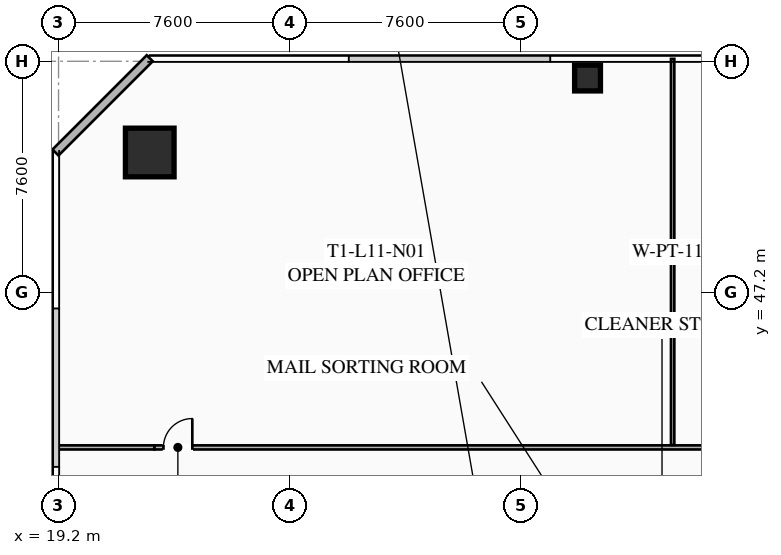
"""IFC4 building model, lengths in metres.
Left out: names, types, materials, properties, quantities, classifications, styles, units other than length and angle.
Written with IfcOpenShell. Run it as: python <this file> out.ifc"""

import sys

from ifc_helpers import new_model, si_unit, direction, frame, frame_2d, origin, origin_2d, place, context, subcontext, project, spatial, rectangle, hollow_rectangle, extrude, element, fill, save


model = new_model("IFC4")
c1 = context("Model", 3, precision=1e-05, world=origin(), true_north=direction((0.0, 1.0)))
c2 = subcontext(c1, "Body", "Model", "MODEL_VIEW")
j1 = project(units=[si_unit("LENGTHUNIT", "METRE"), si_unit("PLANEANGLEUNIT", "RADIAN")], contexts=[c1])
p1 = place(None, origin())
s1 = spatial("IfcSite", under=j1, at=p1, CompositionType="ELEMENT")
p2 = place(p1, origin())
s2 = spatial("IfcBuilding", under=s1, at=p2, CompositionType="ELEMENT")
p3 = place(p2, frame((0.0, 0.0, 45.9)))
s3 = spatial("IfcBuildingStorey", under=s2, at=p3, CompositionType="ELEMENT", Elevation=45.9)
p4 = place(p3, frame((22.2, 51.8, 0.0), z_axis=(0.0, 0.0, 1.0), x_axis=(1.0, 0.0, 0.0)))
e1 = element("IfcColumn", 1, at=p4, inside=s3, PredefinedType="COLUMN", context=c2, shape_type="SweptSolid", body=[
    extrude(hollow_rectangle(XDim=1.6, YDim=1.6, WallThickness=0.06, at=origin_2d()), origin(), (0.0, 0.0, 1.0), 3.35),
])
p5 = place(p3, frame((36.6, 54.25, 0.0), z_axis=(0.0, 0.0, 1.0), x_axis=(1.0, 0.0, 0.0)))
e2 = element("IfcColumn", 2, at=p5, inside=s3, PredefinedType="COLUMN", context=c2, shape_type="SweptSolid", body=[
    extrude(hollow_rectangle(XDim=0.85, YDim=0.85, WallThickness=0.035, at=origin_2d()), origin(), (0.0, 0.0, 1.0), 3.35),
])
p6 = place(p3, frame((19.1, 51.8, 0.0), z_axis=(0.0, 0.0, 1.0), x_axis=(0.707106781187, 0.707106781187, 0.0)))
e3 = element("IfcWall", 3, at=p6, inside=s3, PredefinedType="SOLIDWALL", context=c2, shape_type="SweptSolid", body=[
    extrude(rectangle(XDim=4.384, YDim=0.28, at=frame_2d((2.192, 0.0))), origin(), (0.0, 0.0, 1.0), 3.35),
])
p7 = place(p3, frame((22.35, 42.1, 0.0), z_axis=(0.0, 0.0, 1.0), x_axis=(1.0, 0.0, 0.0)))
e4 = element("IfcWall", 4, at=p7, inside=s3, PredefinedType="PARTITIONING", context=c2, shape_type="SweptSolid", body=[
    extrude(rectangle(XDim=30.8, YDim=0.135, at=frame_2d((15.4, 0.0))), origin(), (0.0, 0.0, 1.0), 2.703),
])
p8 = place(p7, frame((0.3, 0.0, 0.0)))
e5 = element("IfcOpeningElement", 5, at=p8, cuts=e4, PredefinedType="OPENING", context=c2, shape_type="SweptSolid", body=[
    extrude(rectangle(XDim=0.95, YDim=2.05, at=frame_2d((0.475, 1.025))), frame((0.0, 0.077, 0.0), z_axis=(0.0, -1.0, 0.0), x_axis=(1.0, 0.0, 0.0)), (0.0, 0.0, 1.0), 0.155),
])
p9 = place(p7, frame((29.55, 0.0, 0.0)))
e6 = element("IfcOpeningElement", 6, at=p9, cuts=e4, PredefinedType="OPENING", context=c2, shape_type="SweptSolid", body=[
    extrude(rectangle(XDim=0.95, YDim=2.05, at=frame_2d((0.475, 1.025))), frame((0.0, 0.077, 0.0), z_axis=(0.0, -1.0, 0.0), x_axis=(1.0, 0.0, 0.0)), (0.0, 0.0, 1.0), 0.155),
])
p10 = place(p3, frame((19.12, 42.1, 0.0), z_axis=(0.0, 0.0, 1.0), x_axis=(1.0, 0.0, 0.0)))
e7 = element("IfcWall", 7, at=p10, inside=s3, PredefinedType="PARTITIONING", context=c2, shape_type="SweptSolid", body=[
    extrude(rectangle(XDim=3.23, YDim=0.135, at=frame_2d((1.615, 0.0))), origin(), (0.0, 0.0, 1.0), 2.703),
])
p11 = place(p3, frame((39.4, 42.18, 0.0), z_axis=(0.0, 0.0, 1.0), x_axis=(0.0, 1.0, 0.0)))
e8 = element("IfcWall", 8, at=p11, inside=s3, PredefinedType="PARTITIONING", context=c2, shape_type="SweptSolid", body=[
    extrude(rectangle(XDim=12.7, YDim=0.11, at=frame_2d((6.35, 0.0))), origin(), (0.0, 0.0, 1.0), 2.703),
])
p12 = place(p8, origin())
e9 = element("IfcDoor", 9, at=p12, inside=s3, OperationType="SINGLE_SWING_RIGHT", PredefinedType="DOOR", context=c2, shape_type="SweptSolid", body=[
    extrude(rectangle(XDim=0.95, YDim=2.05, at=frame_2d((0.475, 1.025))), frame((0.0, 0.025, 0.0), z_axis=(0.0, -1.0, 0.0), x_axis=(1.0, 0.0, 0.0)), (0.0, 0.0, 1.0), 0.05),
])
fill(e5, e9)
save(model, sys.argv[1])
